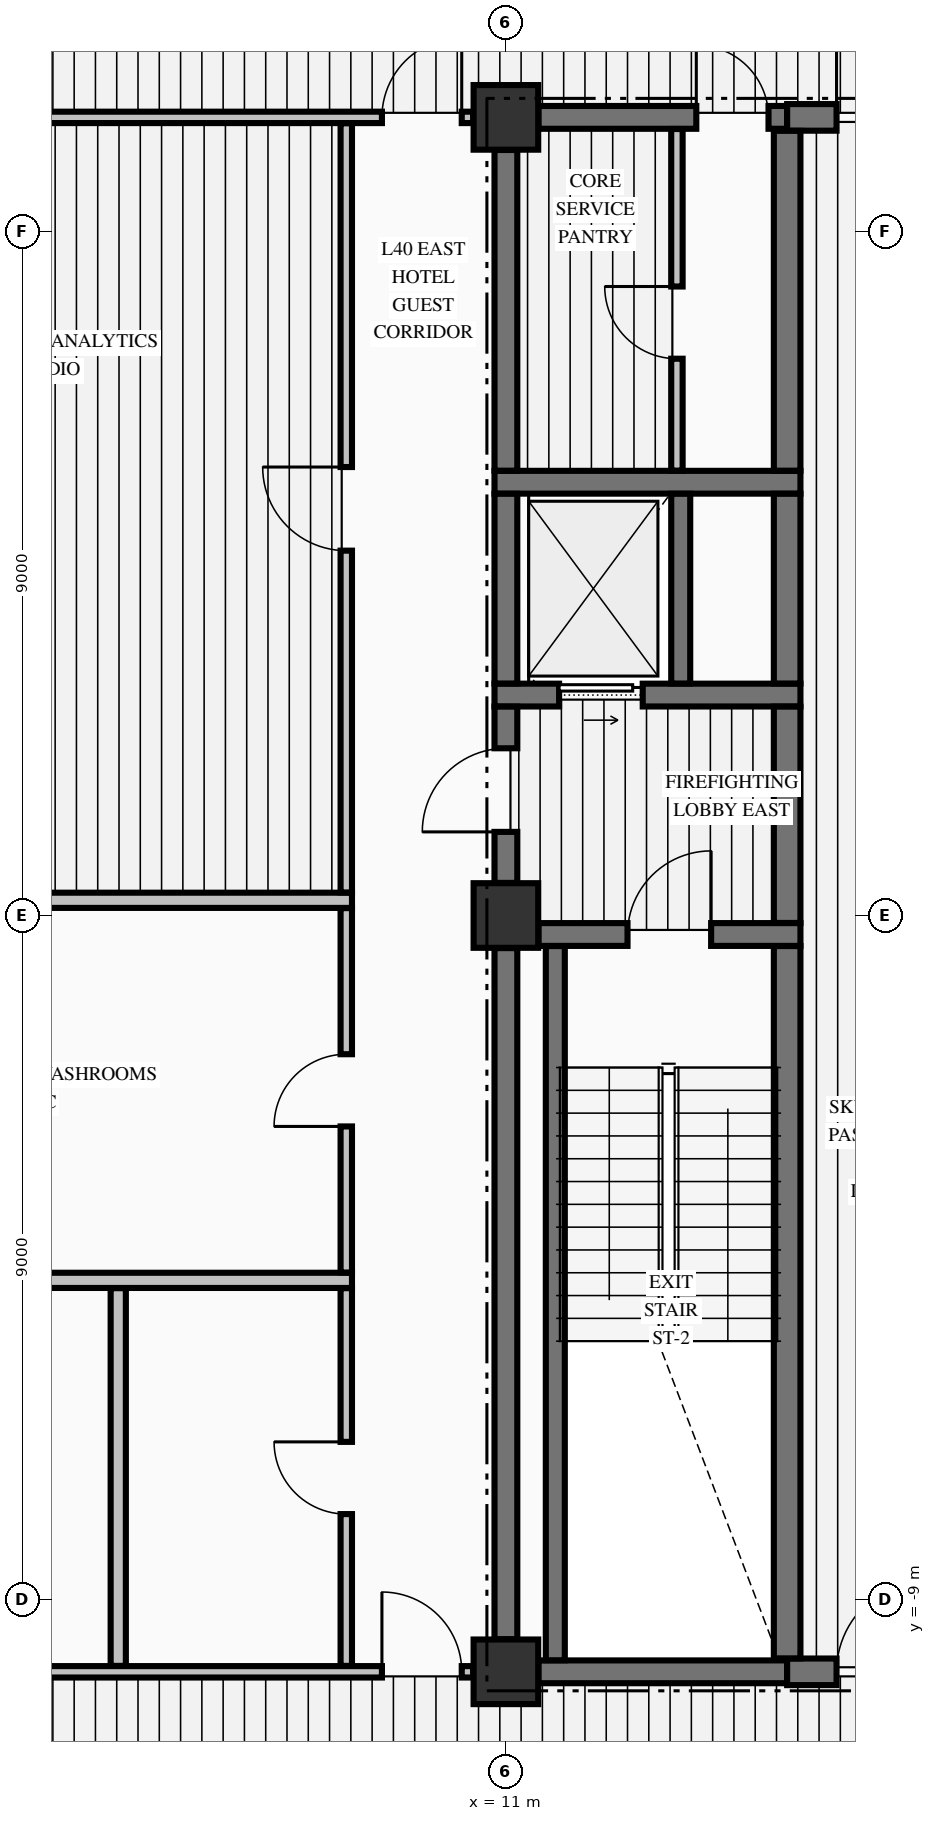
"""IFC4 building model, lengths in metres.
Left out: names, types, materials, properties, quantities, classifications, styles, units other than length and angle.
Written with IfcOpenShell. Run it as: python <this file> out.ifc"""

import sys

from ifc_helpers import new_model, si_unit, direction, frame, frame_2d, origin, origin_2d, place, context, subcontext, project, spatial, rectangle, extrude, element, fill, save


model = new_model("IFC4")
c1 = context("Model", 3, precision=1e-05, world=origin(), true_north=direction((0.0, 1.0)))
c2 = subcontext(c1, "Body", "Model", "MODEL_VIEW")
j1 = project(units=[si_unit("LENGTHUNIT", "METRE"), si_unit("PLANEANGLEUNIT", "RADIAN")], contexts=[c1])
p1 = place(None, origin())
s1 = spatial("IfcSite", under=j1, at=p1, CompositionType="ELEMENT")
p2 = place(p1, origin())
s2 = spatial("IfcBuilding", under=s1, at=p2, CompositionType="ELEMENT")
p3 = place(p2, frame((0.0, 0.0, 158.24)))
s3 = spatial("IfcBuildingStorey", under=s2, at=p3, CompositionType="ELEMENT", Elevation=158.24)
for number, where, z_axis, x_axis in (
    (1, (11.0, -9.95, -0.425), (0.0, 0.0, 1.0), (1.0, 0.0, 0.0)),
    (2, (11.0, 0.0, -0.425), (0.0, 0.0, 1.0), (1.0, 0.0, 0.0)),
    (3, (11.0, 10.5, -0.425), (0.0, 0.0, 1.0), (1.0, 0.0, 0.0)),
):
    element("IfcColumn", number, at=place(p3, frame(where, z_axis=z_axis, x_axis=x_axis)), inside=s3, PredefinedType="COLUMN", context=c2, shape_type="SweptSolid", body=[
        extrude(rectangle(XDim=0.85, YDim=0.85, at=origin_2d()), origin(), (0.0, 0.0, 1.0), 4.595),
    ])
p4 = place(p3, frame((11.429, -9.95, 0.0), z_axis=(0.0, 0.0, 1.0), x_axis=(1.0, 0.0, 0.0)))
e4 = element("IfcWall", 4, at=p4, inside=s3, PredefinedType="SHEAR", context=c2, shape_type="SweptSolid", body=[
    extrude(rectangle(XDim=3.271, YDim=0.3, at=frame_2d((1.635, 0.0))), origin(), (0.0, 0.0, 1.0), 4.17),
])
p5 = place(p3, frame((14.7, -9.95, 0.0), z_axis=(0.0, 0.0, 1.0), x_axis=(1.0, 0.0, 0.0)))
e5 = element("IfcWall", 5, at=p5, inside=s3, PredefinedType="SHEAR", context=c2, shape_type="SweptSolid", body=[
    extrude(rectangle(XDim=4.871, YDim=0.35, at=frame_2d((2.436, 0.0))), origin(), (0.0, 0.0, 1.0), 4.17),
])
p6 = place(p5, frame((0.65, 0.0, 0.0)))
e6 = element("IfcOpeningElement", 6, at=p6, cuts=e5, PredefinedType="OPENING", context=c2, shape_type="SweptSolid", body=[
    extrude(rectangle(XDim=1.2, YDim=2.15, at=frame_2d((0.6, 1.075))), frame((0.0, 0.185, 0.0), z_axis=(0.0, -1.0, 0.0), x_axis=(1.0, 0.0, 0.0)), (0.0, 0.0, 1.0), 0.37),
])
p7 = place(p5, frame((3.25, 0.0, 0.0)))
e7 = element("IfcOpeningElement", 7, at=p7, cuts=e5, PredefinedType="OPENING", context=c2, shape_type="SweptSolid", body=[
    extrude(rectangle(XDim=0.9, YDim=2.15, at=frame_2d((0.45, 1.075))), frame((0.0, 0.185, 0.0), z_axis=(0.0, -1.0, 0.0), x_axis=(1.0, 0.0, 0.0)), (0.0, 0.0, 1.0), 0.37),
])
p8 = place(p3, frame((11.429, -0.25, 0.0), z_axis=(0.0, 0.0, 1.0), x_axis=(1.0, 0.0, 0.0)))
e8 = element("IfcWall", 8, at=p8, inside=s3, PredefinedType="SHEAR", context=c2, shape_type="SweptSolid", body=[
    extrude(rectangle(XDim=3.446, YDim=0.3, at=frame_2d((1.723, 0.0))), origin(), (0.0, 0.0, 1.0), 4.17),
])
p9 = place(p8, frame((1.171, 0.0, 0.0)))
e9 = element("IfcOpeningElement", 9, at=p9, cuts=e8, PredefinedType="OPENING", context=c2, shape_type="SweptSolid", body=[
    extrude(rectangle(XDim=1.1, YDim=2.15, at=frame_2d((0.55, 1.075))), frame((0.0, 0.16, 0.0), z_axis=(0.0, -1.0, 0.0), x_axis=(1.0, 0.0, 0.0)), (0.0, 0.0, 1.0), 0.32),
])
p10 = place(p3, frame((10.85, 2.9, 0.0), z_axis=(0.0, 0.0, 1.0), x_axis=(1.0, 0.0, 0.0)))
e10 = element("IfcWall", 10, at=p10, inside=s3, PredefinedType="SHEAR", context=c2, shape_type="SweptSolid", body=[
    extrude(rectangle(XDim=4.025, YDim=0.3, at=frame_2d((2.012, 0.0))), origin(), (0.0, 0.0, 1.0), 4.17),
])
p11 = place(p10, frame((0.85, 0.0, 0.0)))
e11 = element("IfcOpeningElement", 11, at=p11, cuts=e10, PredefinedType="OPENING", context=c2, shape_type="SweptSolid", body=[
    extrude(rectangle(XDim=1.1, YDim=2.2, at=frame_2d((0.55, 1.1))), frame((0.0, 0.16, 0.0), z_axis=(0.0, -1.0, 0.0), x_axis=(1.0, 0.0, 0.0)), (0.0, 0.0, 1.0), 0.32),
])
p12 = place(p3, frame((10.85, 5.7, 0.0), z_axis=(0.0, 0.0, 1.0), x_axis=(1.0, 0.0, 0.0)))
e12 = element("IfcWall", 12, at=p12, inside=s3, PredefinedType="SHEAR", context=c2, shape_type="SweptSolid", body=[
    extrude(rectangle(XDim=4.025, YDim=0.3, at=frame_2d((2.012, 0.0))), origin(), (0.0, 0.0, 1.0), 4.17),
])
p13 = place(p3, frame((11.429, 10.5, 0.0), z_axis=(0.0, 0.0, 1.0), x_axis=(1.0, 0.0, 0.0)))
e13 = element("IfcWall", 13, at=p13, inside=s3, PredefinedType="SHEAR", context=c2, shape_type="SweptSolid", body=[
    extrude(rectangle(XDim=3.271, YDim=0.3, at=frame_2d((1.635, 0.0))), origin(), (0.0, 0.0, 1.0), 4.17),
])
p14 = place(p13, frame((2.076, 0.0, 0.0)))
e14 = element("IfcOpeningElement", 14, at=p14, cuts=e13, PredefinedType="OPENING", context=c2, shape_type="SweptSolid", body=[
    extrude(rectangle(XDim=0.95, YDim=2.15, at=frame_2d((0.475, 1.075))), frame((0.0, 0.16, 0.0), z_axis=(0.0, -1.0, 0.0), x_axis=(1.0, 0.0, 0.0)), (0.0, 0.0, 1.0), 0.32),
])
p15 = place(p3, frame((14.7, 10.5, 0.0), z_axis=(0.0, 0.0, 1.0), x_axis=(1.0, 0.0, 0.0)))
e15 = element("IfcWall", 15, at=p15, inside=s3, PredefinedType="SHEAR", context=c2, shape_type="SweptSolid", body=[
    extrude(rectangle(XDim=4.871, YDim=0.35, at=frame_2d((2.436, 0.0))), origin(), (0.0, 0.0, 1.0), 4.17),
])
p16 = place(p15, frame((0.65, 0.0, 0.0)))
e16 = element("IfcOpeningElement", 16, at=p16, cuts=e15, PredefinedType="OPENING", context=c2, shape_type="SweptSolid", body=[
    extrude(rectangle(XDim=1.2, YDim=2.15, at=frame_2d((0.6, 1.075))), frame((0.0, 0.185, 0.0), z_axis=(0.0, -1.0, 0.0), x_axis=(1.0, 0.0, 0.0)), (0.0, 0.0, 1.0), 0.37),
])
p17 = place(p3, frame((-10.569, -9.95, 0.0), z_axis=(0.0, 0.0, 1.0), x_axis=(1.0, 0.0, 0.0)))
e17 = element("IfcWall", 17, at=p17, inside=s3, PredefinedType="PARTITIONING", context=c2, shape_type="SweptSolid", body=[
    extrude(rectangle(XDim=21.138, YDim=0.15, at=frame_2d((10.569, 0.0))), origin(), (0.0, 0.0, 1.0), 4.17),
])
p18 = place(p17, frame((0.15, 0.0, 0.0)))
e18 = element("IfcOpeningElement", 18, at=p18, cuts=e17, PredefinedType="OPENING", context=c2, shape_type="SweptSolid", body=[
    extrude(rectangle(XDim=1.05, YDim=2.15, at=frame_2d((0.525, 1.075))), frame((0.0, 0.085, 0.0), z_axis=(0.0, -1.0, 0.0), x_axis=(1.0, 0.0, 0.0)), (0.0, 0.0, 1.0), 0.17),
])
p19 = place(p17, frame((19.938, 0.0, 0.0)))
e19 = element("IfcOpeningElement", 19, at=p19, cuts=e17, PredefinedType="OPENING", context=c2, shape_type="SweptSolid", body=[
    extrude(rectangle(XDim=1.05, YDim=2.15, at=frame_2d((0.525, 1.075))), frame((0.0, 0.085, 0.0), z_axis=(0.0, -1.0, 0.0), x_axis=(1.0, 0.0, 0.0)), (0.0, 0.0, 1.0), 0.17),
])
p20 = place(p17, frame((13.944, 0.0, 0.0)))
e20 = element("IfcOpeningElement", 20, at=p20, cuts=e17, PredefinedType="OPENING", context=c2, shape_type="SweptSolid", body=[
    extrude(rectangle(XDim=0.95, YDim=2.15, at=frame_2d((0.475, 1.075))), frame((0.0, 0.085, 0.0), z_axis=(0.0, -1.0, 0.0), x_axis=(1.0, 0.0, 0.0)), (0.0, 0.0, 1.0), 0.17),
])
for number, where, z_axis, x_axis in (
    (21, (1.7, -4.8, 0.0), (0.0, 0.0, 1.0), (1.0, 0.0, 0.0)),
    (22, (1.7, 0.2, 0.0), (0.0, 0.0, 1.0), (1.0, 0.0, 0.0)),
):
    element("IfcWall", number, at=place(p3, frame(where, z_axis=z_axis, x_axis=x_axis)), inside=s3, PredefinedType="PARTITIONING", context=c2, shape_type="SweptSolid", body=[
        extrude(rectangle(XDim=7.275, YDim=0.2, at=frame_2d((3.638, 0.0))), origin(), (0.0, 0.0, 1.0), 4.17),
    ])
p21 = place(p3, frame((-10.569, 10.5, 0.0), z_axis=(0.0, 0.0, 1.0), x_axis=(1.0, 0.0, 0.0)))
e23 = element("IfcWall", 23, at=p21, inside=s3, PredefinedType="PARTITIONING", context=c2, shape_type="SweptSolid", body=[
    extrude(rectangle(XDim=21.138, YDim=0.15, at=frame_2d((10.569, 0.0))), origin(), (0.0, 0.0, 1.0), 4.17),
])
p22 = place(p21, frame((0.15, 0.0, 0.0)))
e24 = element("IfcOpeningElement", 24, at=p22, cuts=e23, PredefinedType="OPENING", context=c2, shape_type="SweptSolid", body=[
    extrude(rectangle(XDim=1.05, YDim=2.15, at=frame_2d((0.525, 1.075))), frame((0.0, 0.085, 0.0), z_axis=(0.0, -1.0, 0.0), x_axis=(1.0, 0.0, 0.0)), (0.0, 0.0, 1.0), 0.17),
])
p23 = place(p21, frame((19.938, 0.0, 0.0)))
e25 = element("IfcOpeningElement", 25, at=p23, cuts=e23, PredefinedType="OPENING", context=c2, shape_type="SweptSolid", body=[
    extrude(rectangle(XDim=1.05, YDim=2.15, at=frame_2d((0.525, 1.075))), frame((0.0, 0.085, 0.0), z_axis=(0.0, -1.0, 0.0), x_axis=(1.0, 0.0, 0.0)), (0.0, 0.0, 1.0), 0.17),
])
p24 = place(p3, frame((11.0, -9.521, 0.0), z_axis=(0.0, 0.0, 1.0), x_axis=(0.0, 1.0, 0.0)))
e26 = element("IfcWall", 26, at=p24, inside=s3, PredefinedType="SHEAR", context=c2, shape_type="SweptSolid", body=[
    extrude(rectangle(XDim=9.092, YDim=0.3, at=frame_2d((4.546, 0.0))), origin(), (0.0, 0.0, 1.0), 4.17),
])
p25 = place(p3, frame((11.0, 0.429, 0.0), z_axis=(0.0, 0.0, 1.0), x_axis=(0.0, 1.0, 0.0)))
e27 = element("IfcWall", 27, at=p25, inside=s3, PredefinedType="SHEAR", context=c2, shape_type="SweptSolid", body=[
    extrude(rectangle(XDim=2.319, YDim=0.3, at=frame_2d((1.16, 0.0))), origin(), (0.0, 0.0, 1.0), 4.17),
])
p26 = place(p25, frame((0.671, 0.0, 0.0)))
e28 = element("IfcOpeningElement", 28, at=p26, cuts=e27, PredefinedType="OPENING", context=c2, shape_type="SweptSolid", body=[
    extrude(rectangle(XDim=1.1, YDim=2.15, at=frame_2d((0.55, 1.075))), frame((0.0, 0.16, 0.0), z_axis=(0.0, -1.0, 0.0), x_axis=(1.0, 0.0, 0.0)), (0.0, 0.0, 1.0), 0.32),
])
p27 = place(p3, frame((11.0, 3.052, 0.0), z_axis=(0.0, 0.0, 1.0), x_axis=(0.0, 1.0, 0.0)))
e29 = element("IfcWall", 29, at=p27, inside=s3, PredefinedType="SHEAR", context=c2, shape_type="SweptSolid", body=[
    extrude(rectangle(XDim=2.496, YDim=0.3, at=frame_2d((1.248, 0.0))), origin(), (0.0, 0.0, 1.0), 4.17),
])
p28 = place(p3, frame((11.0, 5.852, 0.0), z_axis=(0.0, 0.0, 1.0), x_axis=(0.0, 1.0, 0.0)))
e30 = element("IfcWall", 30, at=p28, inside=s3, PredefinedType="SHEAR", context=c2, shape_type="SweptSolid", body=[
    extrude(rectangle(XDim=4.219, YDim=0.3, at=frame_2d((2.109, 0.0))), origin(), (0.0, 0.0, 1.0), 4.17),
])
p29 = place(p3, frame((11.65, -9.798, 0.0), z_axis=(0.0, 0.0, 1.0), x_axis=(0.0, 1.0, 0.0)))
e31 = element("IfcWall", 31, at=p29, inside=s3, PredefinedType="SOLIDWALL", context=c2, shape_type="SweptSolid", body=[
    extrude(rectangle(XDim=9.396, YDim=0.25, at=frame_2d((4.698, 0.0))), origin(), (0.0, 0.0, 1.0), 4.17),
])
p30 = place(p3, frame((13.3, 3.052, 0.0), z_axis=(0.0, 0.0, 1.0), x_axis=(0.0, 1.0, 0.0)))
e32 = element("IfcWall", 32, at=p30, inside=s3, PredefinedType="SOLIDWALL", context=c2, shape_type="SweptSolid", body=[
    extrude(rectangle(XDim=2.496, YDim=0.25, at=frame_2d((1.248, 0.0))), origin(), (0.0, 0.0, 1.0), 4.17),
])
p31 = place(p3, frame((14.7, -9.773, 0.0), z_axis=(0.0, 0.0, 1.0), x_axis=(0.0, 1.0, 0.0)))
e33 = element("IfcWall", 33, at=p31, inside=s3, PredefinedType="SHEAR", context=c2, shape_type="SweptSolid", body=[
    extrude(rectangle(XDim=9.371, YDim=0.35, at=frame_2d((4.686, 0.0))), origin(), (0.0, 0.0, 1.0), 4.17),
])
p32 = place(p3, frame((14.7, -0.098, 0.0), z_axis=(0.0, 0.0, 1.0), x_axis=(0.0, 1.0, 0.0)))
e34 = element("IfcWall", 34, at=p32, inside=s3, PredefinedType="SHEAR", context=c2, shape_type="SweptSolid", body=[
    extrude(rectangle(XDim=2.846, YDim=0.35, at=frame_2d((1.423, 0.0))), origin(), (0.0, 0.0, 1.0), 4.17),
])
p33 = place(p3, frame((14.7, 3.052, 0.0), z_axis=(0.0, 0.0, 1.0), x_axis=(0.0, 1.0, 0.0)))
e35 = element("IfcWall", 35, at=p33, inside=s3, PredefinedType="SHEAR", context=c2, shape_type="SweptSolid", body=[
    extrude(rectangle(XDim=2.496, YDim=0.35, at=frame_2d((1.248, 0.0))), origin(), (0.0, 0.0, 1.0), 4.17),
])
p34 = place(p3, frame((14.7, 5.852, 0.0), z_axis=(0.0, 0.0, 1.0), x_axis=(0.0, 1.0, 0.0)))
e36 = element("IfcWall", 36, at=p34, inside=s3, PredefinedType="SHEAR", context=c2, shape_type="SweptSolid", body=[
    extrude(rectangle(XDim=4.471, YDim=0.35, at=frame_2d((2.235, 0.0))), origin(), (0.0, 0.0, 1.0), 4.17),
])
p35 = place(p3, frame((5.9, -9.872, 0.0), z_axis=(0.0, 0.0, 1.0), x_axis=(0.0, 1.0, 0.0)))
e37 = element("IfcWall", 37, at=p35, inside=s3, PredefinedType="PARTITIONING", context=c2, shape_type="SweptSolid", body=[
    extrude(rectangle(XDim=4.969, YDim=0.2, at=frame_2d((2.484, 0.0))), origin(), (0.0, 0.0, 1.0), 4.17),
])
p36 = place(p3, frame((8.9, -9.872, 0.0), z_axis=(0.0, 0.0, 1.0), x_axis=(0.0, 1.0, 0.0)))
e38 = element("IfcWall", 38, at=p36, inside=s3, PredefinedType="PARTITIONING", context=c2, shape_type="SweptSolid", body=[
    extrude(rectangle(XDim=4.969, YDim=0.15, at=frame_2d((2.484, 0.0))), origin(), (0.0, 0.0, 1.0), 4.17),
])
p37 = place(p36, frame((1.997, 0.0, 0.0)))
e39 = element("IfcOpeningElement", 39, at=p37, cuts=e38, PredefinedType="OPENING", context=c2, shape_type="SweptSolid", body=[
    extrude(rectangle(XDim=0.95, YDim=2.15, at=frame_2d((0.475, 1.075))), frame((0.0, 0.085, 0.0), z_axis=(0.0, -1.0, 0.0), x_axis=(1.0, 0.0, 0.0)), (0.0, 0.0, 1.0), 0.17),
])
p38 = place(p3, frame((8.9, -4.697, 0.0), z_axis=(0.0, 0.0, 1.0), x_axis=(0.0, 1.0, 0.0)))
e40 = element("IfcWall", 40, at=p38, inside=s3, PredefinedType="PARTITIONING", context=c2, shape_type="SweptSolid", body=[
    extrude(rectangle(XDim=4.794, YDim=0.15, at=frame_2d((2.397, 0.0))), origin(), (0.0, 0.0, 1.0), 4.17),
])
p39 = place(p38, frame((1.922, 0.0, 0.0)))
e41 = element("IfcOpeningElement", 41, at=p39, cuts=e40, PredefinedType="OPENING", context=c2, shape_type="SweptSolid", body=[
    extrude(rectangle(XDim=0.95, YDim=2.15, at=frame_2d((0.475, 1.075))), frame((0.0, 0.085, 0.0), z_axis=(0.0, -1.0, 0.0), x_axis=(1.0, 0.0, 0.0)), (0.0, 0.0, 1.0), 0.17),
])
p40 = place(p3, frame((8.9, 0.303, 0.0), z_axis=(0.0, 0.0, 1.0), x_axis=(0.0, 1.0, 0.0)))
e42 = element("IfcWall", 42, at=p40, inside=s3, PredefinedType="PARTITIONING", context=c2, shape_type="SweptSolid", body=[
    extrude(rectangle(XDim=10.119, YDim=0.15, at=frame_2d((5.06, 0.0))), origin(), (0.0, 0.0, 1.0), 4.17),
])
p41 = place(p40, frame((4.497, 0.0, 0.0)))
e43 = element("IfcOpeningElement", 43, at=p41, cuts=e42, PredefinedType="OPENING", context=c2, shape_type="SweptSolid", body=[
    extrude(rectangle(XDim=1.1, YDim=2.15, at=frame_2d((0.55, 1.075))), frame((0.0, 0.085, 0.0), z_axis=(0.0, -1.0, 0.0), x_axis=(1.0, 0.0, 0.0)), (0.0, 0.0, 1.0), 0.17),
])
p42 = place(p3, frame((13.25, 5.853, 0.0), z_axis=(0.0, 0.0, 1.0), x_axis=(0.0, 1.0, 0.0)))
e44 = element("IfcWall", 44, at=p42, inside=s3, PredefinedType="PARTITIONING", context=c2, shape_type="SweptSolid", body=[
    extrude(rectangle(XDim=4.494, YDim=0.15, at=frame_2d((2.247, 0.0))), origin(), (0.0, 0.0, 1.0), 4.17),
])
p43 = place(p42, frame((1.472, 0.0, 0.0)))
e45 = element("IfcOpeningElement", 45, at=p43, cuts=e44, PredefinedType="OPENING", context=c2, shape_type="SweptSolid", body=[
    extrude(rectangle(XDim=0.95, YDim=2.15, at=frame_2d((0.475, 1.075))), frame((0.0, 0.085, 0.0), z_axis=(0.0, -1.0, 0.0), x_axis=(1.0, 0.0, 0.0)), (0.0, 0.0, 1.0), 0.17),
])
p44 = place(p9, origin())
e46 = element("IfcDoor", 46, at=p44, inside=s3, OperationType="SINGLE_SWING_RIGHT", PredefinedType="DOOR", context=c2, shape_type="SweptSolid", body=[
    extrude(rectangle(XDim=1.1, YDim=2.15, at=frame_2d((0.55, 1.075))), frame((0.0, 0.025, 0.0), z_axis=(0.0, -1.0, 0.0), x_axis=(1.0, 0.0, 0.0)), (0.0, 0.0, 1.0), 0.05),
])
fill(e9, e46)
p45 = place(p26, origin())
e47 = element("IfcDoor", 47, at=p45, inside=s3, OperationType="SINGLE_SWING_LEFT", PredefinedType="DOOR", context=c2, shape_type="SweptSolid", body=[
    extrude(rectangle(XDim=1.1, YDim=2.15, at=frame_2d((0.55, 1.075))), frame((0.0, 0.025, 0.0), z_axis=(0.0, -1.0, 0.0), x_axis=(1.0, 0.0, 0.0)), (0.0, 0.0, 1.0), 0.05),
])
fill(e28, e47)
p46 = place(p11, origin())
e48 = element("IfcDoor", 48, at=p46, inside=s3, OperationType="SLIDING_TO_RIGHT", PredefinedType="DOOR", context=c2, shape_type="SweptSolid", body=[
    extrude(rectangle(XDim=1.1, YDim=2.2, at=frame_2d((0.55, 1.1))), frame((0.0, 0.025, 0.0), z_axis=(0.0, -1.0, 0.0), x_axis=(1.0, 0.0, 0.0)), (0.0, 0.0, 1.0), 0.05),
])
fill(e11, e48)
p47 = place(p14, origin())
e49 = element("IfcDoor", 49, at=p47, inside=s3, OperationType="SINGLE_SWING_LEFT", PredefinedType="DOOR", context=c2, shape_type="SweptSolid", body=[
    extrude(rectangle(XDim=0.95, YDim=2.15, at=frame_2d((0.475, 1.075))), frame((0.0, 0.025, 0.0), z_axis=(0.0, -1.0, 0.0), x_axis=(1.0, 0.0, 0.0)), (0.0, 0.0, 1.0), 0.05),
])
fill(e14, e49)
p48 = place(p43, origin())
e50 = element("IfcDoor", 50, at=p48, inside=s3, OperationType="SINGLE_SWING_RIGHT", PredefinedType="DOOR", context=c2, shape_type="SweptSolid", body=[
    extrude(rectangle(XDim=0.95, YDim=2.15, at=frame_2d((0.475, 1.075))), frame((0.0, 0.025, 0.0), z_axis=(0.0, -1.0, 0.0), x_axis=(1.0, 0.0, 0.0)), (0.0, 0.0, 1.0), 0.05),
])
fill(e45, e50)
p49 = place(p6, origin())
e51 = element("IfcDoor", 51, at=p49, inside=s3, OperationType="SINGLE_SWING_RIGHT", PredefinedType="DOOR", context=c2, shape_type="SweptSolid", body=[
    extrude(rectangle(XDim=1.2, YDim=2.15, at=frame_2d((0.6, 1.075))), frame((0.0, 0.025, 0.0), z_axis=(0.0, -1.0, 0.0), x_axis=(1.0, 0.0, 0.0)), (0.0, 0.0, 1.0), 0.05),
])
fill(e6, e51)
p50 = place(p16, origin())
e52 = element("IfcDoor", 52, at=p50, inside=s3, OperationType="SINGLE_SWING_LEFT", PredefinedType="DOOR", context=c2, shape_type="SweptSolid", body=[
    extrude(rectangle(XDim=1.2, YDim=2.15, at=frame_2d((0.6, 1.075))), frame((0.0, 0.025, 0.0), z_axis=(0.0, -1.0, 0.0), x_axis=(1.0, 0.0, 0.0)), (0.0, 0.0, 1.0), 0.05),
])
fill(e16, e52)
p51 = place(p23, origin())
e53 = element("IfcDoor", 53, at=p51, inside=s3, OperationType="SINGLE_SWING_RIGHT", PredefinedType="DOOR", context=c2, shape_type="SweptSolid", body=[
    extrude(rectangle(XDim=1.05, YDim=2.15, at=frame_2d((0.525, 1.075))), frame((0.0, 0.025, 0.0), z_axis=(0.0, -1.0, 0.0), x_axis=(1.0, 0.0, 0.0)), (0.0, 0.0, 1.0), 0.05),
])
fill(e25, e53)
p52 = place(p19, origin())
e54 = element("IfcDoor", 54, at=p52, inside=s3, OperationType="SINGLE_SWING_LEFT", PredefinedType="DOOR", context=c2, shape_type="SweptSolid", body=[
    extrude(rectangle(XDim=1.05, YDim=2.15, at=frame_2d((0.525, 1.075))), frame((0.0, 0.025, 0.0), z_axis=(0.0, -1.0, 0.0), x_axis=(1.0, 0.0, 0.0)), (0.0, 0.0, 1.0), 0.05),
])
fill(e19, e54)
p53 = place(p41, origin())
e55 = element("IfcDoor", 55, at=p53, inside=s3, OperationType="SINGLE_SWING_RIGHT", PredefinedType="DOOR", context=c2, shape_type="SweptSolid", body=[
    extrude(rectangle(XDim=1.1, YDim=2.15, at=frame_2d((0.55, 1.075))), frame((0.0, 0.025, 0.0), z_axis=(0.0, -1.0, 0.0), x_axis=(1.0, 0.0, 0.0)), (0.0, 0.0, 1.0), 0.05),
])
fill(e43, e55)
p54 = place(p39, origin())
e56 = element("IfcDoor", 56, at=p54, inside=s3, OperationType="SINGLE_SWING_LEFT", PredefinedType="DOOR", context=c2, shape_type="SweptSolid", body=[
    extrude(rectangle(XDim=0.95, YDim=2.15, at=frame_2d((0.475, 1.075))), frame((0.0, 0.025, 0.0), z_axis=(0.0, -1.0, 0.0), x_axis=(1.0, 0.0, 0.0)), (0.0, 0.0, 1.0), 0.05),
])
fill(e41, e56)
p55 = place(p37, origin())
e57 = element("IfcDoor", 57, at=p55, inside=s3, OperationType="SINGLE_SWING_RIGHT", PredefinedType="DOOR", context=c2, shape_type="SweptSolid", body=[
    extrude(rectangle(XDim=0.95, YDim=2.15, at=frame_2d((0.475, 1.075))), frame((0.0, 0.025, 0.0), z_axis=(0.0, -1.0, 0.0), x_axis=(1.0, 0.0, 0.0)), (0.0, 0.0, 1.0), 0.05),
])
fill(e39, e57)
save(model, sys.argv[1])
